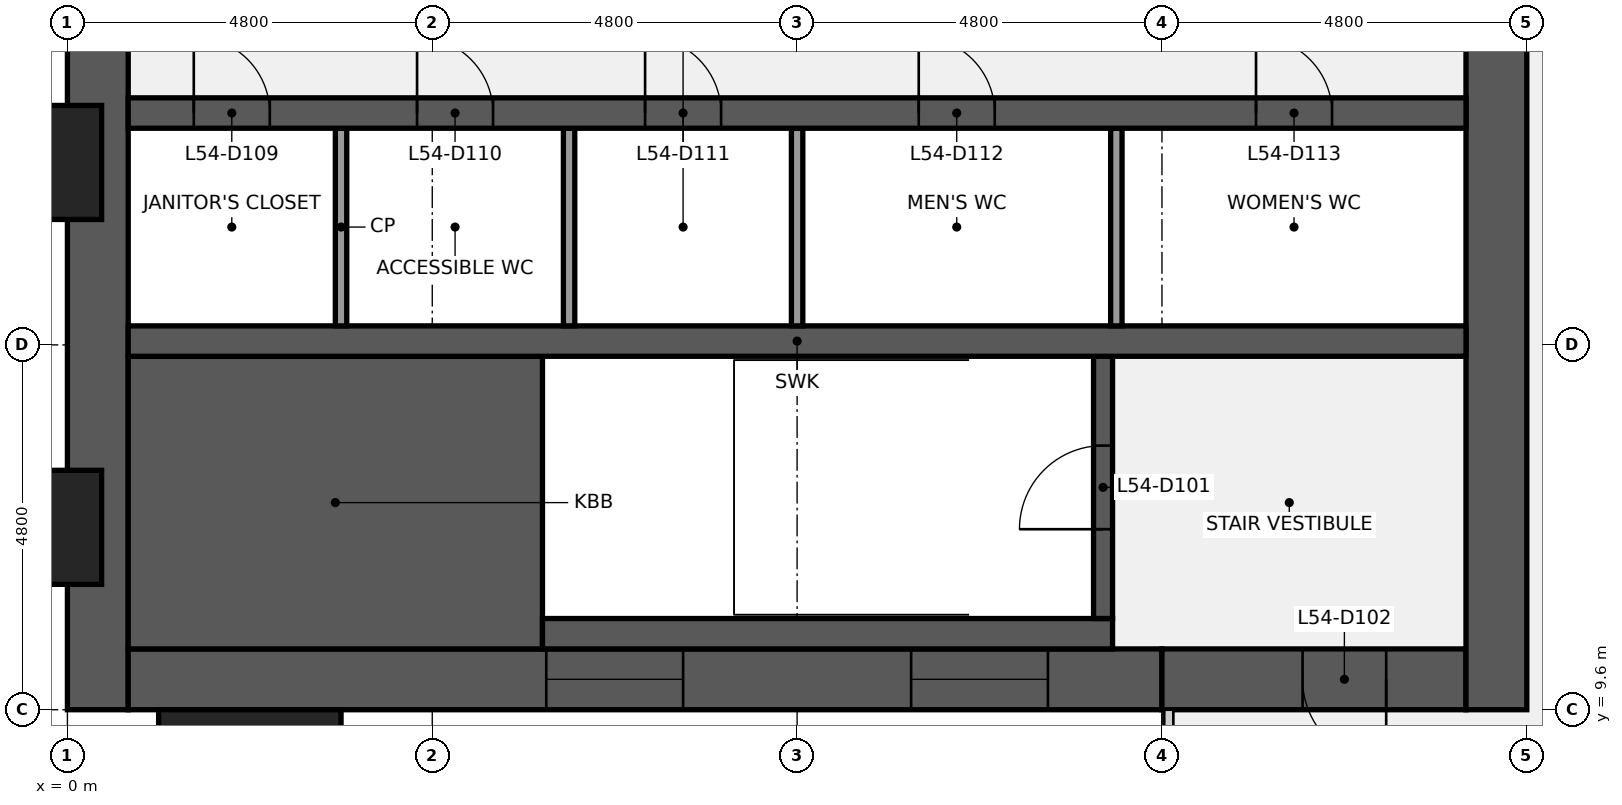
"""IFC4 building model, lengths in metres.
Left out: names, types, materials, properties, quantities, classifications, styles, units other than length and angle.
Written with IfcOpenShell. Run it as: python <this file> out.ifc"""

import sys

from ifc_helpers import new_model, si_unit, direction, frame, frame_2d, origin, origin_2d, place, context, subcontext, project, spatial, rectangle, extrude, element, fill, save


model = new_model("IFC4")
c1 = context("Model", 3, precision=1e-05, world=origin(), true_north=direction((0.0, 1.0)))
c2 = subcontext(c1, "Body", "Model", "MODEL_VIEW")
j1 = project(units=[si_unit("LENGTHUNIT", "METRE"), si_unit("PLANEANGLEUNIT", "RADIAN")], contexts=[c1])
p1 = place(None, origin())
s1 = spatial("IfcSite", under=j1, at=p1, CompositionType="ELEMENT")
p2 = place(p1, origin())
s2 = spatial("IfcBuilding", under=s1, at=p2, CompositionType="ELEMENT")
p3 = place(p2, frame((0.0, 0.0, 245.2)))
s3 = spatial("IfcBuildingStorey", under=s2, at=p3, CompositionType="ELEMENT", Elevation=245.2)
p4 = place(p3, frame((0.4, 9.6, 0.0), z_axis=(0.0, 0.0, 1.0), x_axis=(0.0, 1.0, 0.0)))
e1 = element("IfcWall", 1, at=p4, inside=s3, PredefinedType="SHEAR", context=c2, shape_type="SweptSolid", body=[
    extrude(rectangle(XDim=28.8, YDim=0.8, at=frame_2d((14.4, 0.0))), origin(), (0.0, 0.0, 1.0), 3.84),
])
p5 = place(p4, frame((8.85, 0.0, 0.9)))
e2 = element("IfcOpeningElement", 2, at=p5, cuts=e1, PredefinedType="OPENING", context=c2, shape_type="SweptSolid", body=[
    extrude(rectangle(XDim=1.5, YDim=1.5, at=frame_2d((0.75, 0.75))), frame((0.0, 0.41, 0.0), z_axis=(0.0, -1.0, 0.0), x_axis=(1.0, 0.0, 0.0)), (0.0, 0.0, 1.0), 0.82),
])
p6 = place(p4, frame((18.45, 0.0, 0.9)))
e3 = element("IfcOpeningElement", 3, at=p6, cuts=e1, PredefinedType="OPENING", context=c2, shape_type="SweptSolid", body=[
    extrude(rectangle(XDim=1.5, YDim=1.5, at=frame_2d((0.75, 0.75))), frame((0.0, 0.41, 0.0), z_axis=(0.0, -1.0, 0.0), x_axis=(1.0, 0.0, 0.0)), (0.0, 0.0, 1.0), 0.82),
])
p7 = place(p3, frame((14.4, 10.0, 0.0), z_axis=(0.0, 0.0, 1.0), x_axis=(-1.0, 0.0, 0.0)))
e4 = element("IfcWall", 4, at=p7, inside=s3, PredefinedType="SHEAR", context=c2, shape_type="SweptSolid", body=[
    extrude(rectangle(XDim=13.6, YDim=0.8, at=frame_2d((6.8, 0.0))), origin(), (0.0, 0.0, 1.0), 3.84),
])
p8 = place(p7, frame((6.3, 0.0, 0.9)))
e5 = element("IfcOpeningElement", 5, at=p8, cuts=e4, PredefinedType="OPENING", context=c2, shape_type="SweptSolid", body=[
    extrude(rectangle(XDim=1.8, YDim=1.5, at=frame_2d((0.9, 0.75))), frame((0.0, 0.41, 0.0), z_axis=(0.0, -1.0, 0.0), x_axis=(1.0, 0.0, 0.0)), (0.0, 0.0, 1.0), 0.82),
])
p9 = place(p7, frame((1.5, 0.0, 0.9)))
e6 = element("IfcOpeningElement", 6, at=p9, cuts=e4, PredefinedType="OPENING", context=c2, shape_type="SweptSolid", body=[
    extrude(rectangle(XDim=1.8, YDim=1.5, at=frame_2d((0.9, 0.75))), frame((0.0, 0.41, 0.0), z_axis=(0.0, -1.0, 0.0), x_axis=(1.0, 0.0, 0.0)), (0.0, 0.0, 1.0), 0.82),
])
p10 = place(p3, frame((18.4, 10.0, 0.0), z_axis=(0.0, 0.0, 1.0), x_axis=(-1.0, 0.0, 0.0)))
e7 = element("IfcWall", 7, at=p10, inside=s3, PredefinedType="SHEAR", context=c2, shape_type="SweptSolid", body=[
    extrude(rectangle(XDim=4.0, YDim=0.8, at=frame_2d((2.0, 0.0))), origin(), (0.0, 0.0, 1.0), 3.84),
])
p11 = place(p10, frame((1.05, 0.0, 0.0)))
e8 = element("IfcOpeningElement", 8, at=p11, cuts=e7, PredefinedType="OPENING", context=c2, shape_type="SweptSolid", body=[
    extrude(rectangle(XDim=1.1, YDim=2.1, at=frame_2d((0.55, 1.05))), frame((0.0, 0.41, 0.0), z_axis=(0.0, -1.0, 0.0), x_axis=(1.0, 0.0, 0.0)), (0.0, 0.0, 1.0), 0.82),
])
p12 = place(p3, frame((18.8, 38.4, 0.0), z_axis=(0.0, 0.0, 1.0), x_axis=(0.0, -1.0, 0.0)))
e9 = element("IfcWall", 9, at=p12, inside=s3, PredefinedType="SHEAR", context=c2, shape_type="SweptSolid", body=[
    extrude(rectangle(XDim=28.8, YDim=0.8, at=frame_2d((14.4, 0.0))), origin(), (0.0, 0.0, 1.0), 3.84),
])
p13 = place(p12, frame((18.3, 0.0, 0.0)))
e10 = element("IfcOpeningElement", 10, at=p13, cuts=e9, PredefinedType="OPENING", context=c2, shape_type="SweptSolid", body=[
    extrude(rectangle(XDim=1.8, YDim=2.1, at=frame_2d((0.9, 1.05))), frame((0.0, 0.41, 0.0), z_axis=(0.0, -1.0, 0.0), x_axis=(1.0, 0.0, 0.0)), (0.0, 0.0, 1.0), 0.82),
])
p14 = place(p12, frame((8.7, 0.0, 0.0)))
e11 = element("IfcOpeningElement", 11, at=p14, cuts=e9, PredefinedType="OPENING", context=c2, shape_type="SweptSolid", body=[
    extrude(rectangle(XDim=1.8, YDim=2.1, at=frame_2d((0.9, 1.05))), frame((0.0, 0.41, 0.0), z_axis=(0.0, -1.0, 0.0), x_axis=(1.0, 0.0, 0.0)), (0.0, 0.0, 1.0), 0.82),
])
p15 = place(p3, frame((0.8, 12.325, 0.0), z_axis=(0.0, 0.0, 1.0), x_axis=(1.0, 0.0, 0.0)))
e12 = element("IfcWall", 12, at=p15, inside=s3, PredefinedType="SHEAR", context=c2, shape_type="SweptSolid", body=[
    extrude(rectangle(XDim=5.45, YDim=3.85, at=frame_2d((2.725, 0.0))), origin(), (0.0, 0.0, 1.0), 3.84),
])
p16 = place(p3, frame((6.25, 10.6, 0.0), z_axis=(0.0, 0.0, 1.0), x_axis=(1.0, 0.0, 0.0)))
e13 = element("IfcWall", 13, at=p16, inside=s3, PredefinedType="SHEAR", context=c2, shape_type="SweptSolid", body=[
    extrude(rectangle(XDim=7.5, YDim=0.4, at=frame_2d((3.75, 0.0))), origin(), (0.0, 0.0, 1.0), 3.84),
])
p17 = place(p3, frame((13.625, 10.8, 0.0), z_axis=(0.0, 0.0, 1.0), x_axis=(0.0, 1.0, 0.0)))
e14 = element("IfcWall", 14, at=p17, inside=s3, PredefinedType="SHEAR", context=c2, shape_type="SweptSolid", body=[
    extrude(rectangle(XDim=3.45, YDim=0.25, at=frame_2d((1.725, 0.0))), origin(), (0.0, 0.0, 1.0), 3.84),
])
p18 = place(p17, frame((1.175, 0.0, 0.0)))
e15 = element("IfcOpeningElement", 15, at=p18, cuts=e14, PredefinedType="OPENING", context=c2, shape_type="SweptSolid", body=[
    extrude(rectangle(XDim=1.1, YDim=2.1, at=frame_2d((0.55, 1.05))), frame((0.0, 0.135, 0.0), z_axis=(0.0, -1.0, 0.0), x_axis=(1.0, 0.0, 0.0)), (0.0, 0.0, 1.0), 0.27),
])
p19 = place(p3, frame((0.8, 14.45, 0.0), z_axis=(0.0, 0.0, 1.0), x_axis=(1.0, 0.0, 0.0)))
e16 = element("IfcWall", 16, at=p19, inside=s3, PredefinedType="SHEAR", context=c2, shape_type="SweptSolid", body=[
    extrude(rectangle(XDim=17.6, YDim=0.4, at=frame_2d((8.8, 0.0))), origin(), (0.0, 0.0, 1.0), 3.84),
])
for number, where, z_axis, x_axis in (
    (17, (3.6, 14.65, 0.0), (0.0, 0.0, 1.0), (0.0, 1.0, 0.0)),
    (18, (6.6, 14.65, 0.0), (0.0, 0.0, 1.0), (0.0, 1.0, 0.0)),
    (19, (9.6, 14.65, 0.0), (0.0, 0.0, 1.0), (0.0, 1.0, 0.0)),
    (20, (13.8, 14.65, 0.0), (0.0, 0.0, 1.0), (0.0, 1.0, 0.0)),
):
    element("IfcWall", number, at=place(p3, frame(where, z_axis=z_axis, x_axis=x_axis)), inside=s3, PredefinedType="PARTITIONING", context=c2, shape_type="SweptSolid", body=[
        extrude(rectangle(XDim=2.6, YDim=0.15, at=frame_2d((1.3, 0.0))), origin(), (0.0, 0.0, 1.0), 3.84),
    ])
p20 = place(p3, frame((0.8, 17.45, 0.0), z_axis=(0.0, 0.0, 1.0), x_axis=(1.0, 0.0, 0.0)))
e21 = element("IfcWall", 21, at=p20, inside=s3, PredefinedType="SHEAR", context=c2, shape_type="SweptSolid", body=[
    extrude(rectangle(XDim=17.6, YDim=0.4, at=frame_2d((8.8, 0.0))), origin(), (0.0, 0.0, 1.0), 3.84),
])
p21 = place(p20, frame((0.863, 0.0, 0.0)))
e22 = element("IfcOpeningElement", 22, at=p21, cuts=e21, PredefinedType="OPENING", context=c2, shape_type="SweptSolid", body=[
    extrude(rectangle(XDim=1.0, YDim=2.1, at=frame_2d((0.5, 1.05))), frame((0.0, 0.21, 0.0), z_axis=(0.0, -1.0, 0.0), x_axis=(1.0, 0.0, 0.0)), (0.0, 0.0, 1.0), 0.42),
])
p22 = place(p20, frame((3.8, 0.0, 0.0)))
e23 = element("IfcOpeningElement", 23, at=p22, cuts=e21, PredefinedType="OPENING", context=c2, shape_type="SweptSolid", body=[
    extrude(rectangle(XDim=1.0, YDim=2.1, at=frame_2d((0.5, 1.05))), frame((0.0, 0.21, 0.0), z_axis=(0.0, -1.0, 0.0), x_axis=(1.0, 0.0, 0.0)), (0.0, 0.0, 1.0), 0.42),
])
p23 = place(p20, frame((6.8, 0.0, 0.0)))
e24 = element("IfcOpeningElement", 24, at=p23, cuts=e21, PredefinedType="OPENING", context=c2, shape_type="SweptSolid", body=[
    extrude(rectangle(XDim=1.0, YDim=2.1, at=frame_2d((0.5, 1.05))), frame((0.0, 0.21, 0.0), z_axis=(0.0, -1.0, 0.0), x_axis=(1.0, 0.0, 0.0)), (0.0, 0.0, 1.0), 0.42),
])
p24 = place(p20, frame((10.4, 0.0, 0.0)))
e25 = element("IfcOpeningElement", 25, at=p24, cuts=e21, PredefinedType="OPENING", context=c2, shape_type="SweptSolid", body=[
    extrude(rectangle(XDim=1.0, YDim=2.1, at=frame_2d((0.5, 1.05))), frame((0.0, 0.21, 0.0), z_axis=(0.0, -1.0, 0.0), x_axis=(1.0, 0.0, 0.0)), (0.0, 0.0, 1.0), 0.42),
])
p25 = place(p20, frame((14.837, 0.0, 0.0)))
e26 = element("IfcOpeningElement", 26, at=p25, cuts=e21, PredefinedType="OPENING", context=c2, shape_type="SweptSolid", body=[
    extrude(rectangle(XDim=1.0, YDim=2.1, at=frame_2d((0.5, 1.05))), frame((0.0, 0.21, 0.0), z_axis=(0.0, -1.0, 0.0), x_axis=(1.0, 0.0, 0.0)), (0.0, 0.0, 1.0), 0.42),
])
for number, where, z_axis, x_axis in (
    (27, (-0.75, 12.0, 0.0), (0.0, 0.0, 1.0), (0.0, 1.0, 0.0)),
    (28, (-0.75, 16.8, 0.0), (0.0, 0.0, 1.0), (0.0, 1.0, 0.0)),
    (29, (2.4, 8.85, 0.0), (0.0, 0.0, 1.0), (1.0, 0.0, 0.0)),
):
    element("IfcColumn", number, at=place(p3, frame(where, z_axis=z_axis, x_axis=x_axis)), inside=s3, PredefinedType="PILASTER", context=c2, shape_type="SweptSolid", body=[
        extrude(rectangle(XDim=2.4, YDim=1.5, at=origin_2d()), origin(), (0.0, 0.0, 1.0), 4.0),
    ])
p26 = place(p18, origin())
e30 = element("IfcDoor", 30, at=p26, inside=s3, OperationType="SINGLE_SWING_LEFT", PredefinedType="DOOR", context=c2, shape_type="SweptSolid", body=[
    extrude(rectangle(XDim=1.1, YDim=2.1, at=frame_2d((0.55, 1.05))), frame((0.0, 0.025, 0.0), z_axis=(0.0, -1.0, 0.0), x_axis=(1.0, 0.0, 0.0)), (0.0, 0.0, 1.0), 0.05),
])
fill(e15, e30)
p27 = place(p11, origin())
e31 = element("IfcDoor", 31, at=p27, inside=s3, OperationType="SINGLE_SWING_LEFT", PredefinedType="DOOR", context=c2, shape_type="SweptSolid", body=[
    extrude(rectangle(XDim=1.1, YDim=2.1, at=frame_2d((0.55, 1.05))), frame((0.0, 0.025, 0.0), z_axis=(0.0, -1.0, 0.0), x_axis=(1.0, 0.0, 0.0)), (0.0, 0.0, 1.0), 0.05),
])
fill(e8, e31)
p28 = place(p21, origin())
e32 = element("IfcDoor", 32, at=p28, inside=s3, OperationType="SINGLE_SWING_LEFT", PredefinedType="DOOR", context=c2, shape_type="SweptSolid", body=[
    extrude(rectangle(XDim=1.0, YDim=2.1, at=frame_2d((0.5, 1.05))), frame((0.0, 0.025, 0.0), z_axis=(0.0, -1.0, 0.0), x_axis=(1.0, 0.0, 0.0)), (0.0, 0.0, 1.0), 0.05),
])
fill(e22, e32)
p29 = place(p22, origin())
e33 = element("IfcDoor", 33, at=p29, inside=s3, OperationType="SINGLE_SWING_LEFT", PredefinedType="DOOR", context=c2, shape_type="SweptSolid", body=[
    extrude(rectangle(XDim=1.0, YDim=2.1, at=frame_2d((0.5, 1.05))), frame((0.0, 0.025, 0.0), z_axis=(0.0, -1.0, 0.0), x_axis=(1.0, 0.0, 0.0)), (0.0, 0.0, 1.0), 0.05),
])
fill(e23, e33)
p30 = place(p23, origin())
e34 = element("IfcDoor", 34, at=p30, inside=s3, OperationType="SINGLE_SWING_LEFT", PredefinedType="DOOR", context=c2, shape_type="SweptSolid", body=[
    extrude(rectangle(XDim=1.0, YDim=2.1, at=frame_2d((0.5, 1.05))), frame((0.0, 0.025, 0.0), z_axis=(0.0, -1.0, 0.0), x_axis=(1.0, 0.0, 0.0)), (0.0, 0.0, 1.0), 0.05),
])
fill(e24, e34)
p31 = place(p24, origin())
e35 = element("IfcDoor", 35, at=p31, inside=s3, OperationType="SINGLE_SWING_LEFT", PredefinedType="DOOR", context=c2, shape_type="SweptSolid", body=[
    extrude(rectangle(XDim=1.0, YDim=2.1, at=frame_2d((0.5, 1.05))), frame((0.0, 0.025, 0.0), z_axis=(0.0, -1.0, 0.0), x_axis=(1.0, 0.0, 0.0)), (0.0, 0.0, 1.0), 0.05),
])
fill(e25, e35)
p32 = place(p25, origin())
e36 = element("IfcDoor", 36, at=p32, inside=s3, OperationType="SINGLE_SWING_LEFT", PredefinedType="DOOR", context=c2, shape_type="SweptSolid", body=[
    extrude(rectangle(XDim=1.0, YDim=2.1, at=frame_2d((0.5, 1.05))), frame((0.0, 0.025, 0.0), z_axis=(0.0, -1.0, 0.0), x_axis=(1.0, 0.0, 0.0)), (0.0, 0.0, 1.0), 0.05),
])
fill(e26, e36)
p33 = place(p8, origin())
e37 = element("IfcWindow", 37, at=p33, inside=s3, PartitioningType="SINGLE_PANEL", PredefinedType="WINDOW", context=c2, shape_type="SweptSolid", body=[
    extrude(rectangle(XDim=1.8, YDim=1.5, at=frame_2d((0.9, 0.75))), frame((0.0, 0.03, 0.0), z_axis=(0.0, -1.0, 0.0), x_axis=(1.0, 0.0, 0.0)), (0.0, 0.0, 1.0), 0.06),
])
fill(e5, e37)
p34 = place(p9, origin())
e38 = element("IfcWindow", 38, at=p34, inside=s3, PartitioningType="SINGLE_PANEL", PredefinedType="WINDOW", context=c2, shape_type="SweptSolid", body=[
    extrude(rectangle(XDim=1.8, YDim=1.5, at=frame_2d((0.9, 0.75))), frame((0.0, 0.03, 0.0), z_axis=(0.0, -1.0, 0.0), x_axis=(1.0, 0.0, 0.0)), (0.0, 0.0, 1.0), 0.06),
])
fill(e6, e38)
save(model, sys.argv[1])
